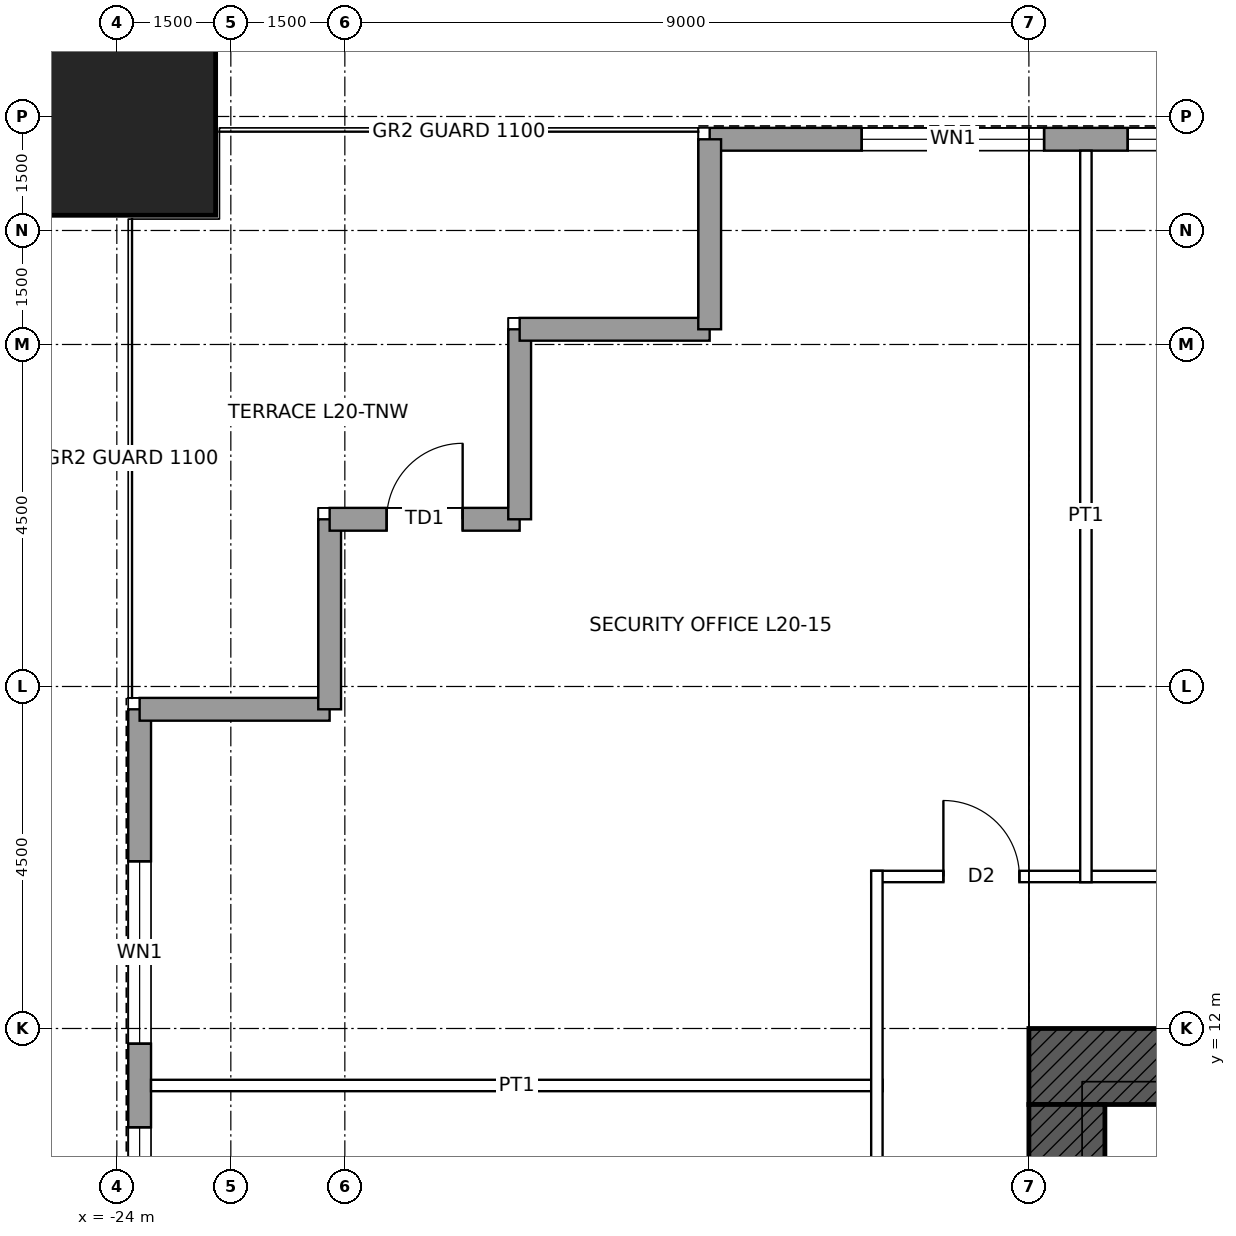
"""IFC4 building model, lengths in metres.
Left out: names, types, materials, properties, quantities, classifications, styles, units other than length and angle.
Written with IfcOpenShell. Run it as: python <this file> out.ifc"""

import sys

from ifc_helpers import new_model, si_unit, direction, frame, frame_2d, origin, origin_2d, place, context, subcontext, project, spatial, rectangle, hollow_rectangle, extrude, element, fill, save


model = new_model("IFC4")
c1 = context("Model", 3, precision=1e-05, world=origin(), true_north=direction((0.0, 1.0)))
c2 = subcontext(c1, "Body", "Model", "MODEL_VIEW")
j1 = project(units=[si_unit("LENGTHUNIT", "METRE"), si_unit("PLANEANGLEUNIT", "RADIAN")], contexts=[c1])
p1 = place(None, origin())
s1 = spatial("IfcSite", under=j1, at=p1, CompositionType="ELEMENT")
p2 = place(p1, origin())
s2 = spatial("IfcBuilding", under=s1, at=p2, CompositionType="ELEMENT")
p3 = place(p2, frame((0.0, 0.0, 104.4)))
s3 = spatial("IfcBuildingStorey", under=s2, at=p3, CompositionType="ELEMENT", Elevation=104.4)
p4 = place(p3, frame((-24.0, 24.0, 0.0), z_axis=(0.0, 0.0, 1.0), x_axis=(1.0, 0.0, 0.0)))
e1 = element("IfcColumn", 1, at=p4, inside=s3, PredefinedType="COLUMN", context=c2, shape_type="SweptSolid", body=[
    extrude(hollow_rectangle(XDim=2.6, YDim=2.6, WallThickness=0.13, at=origin_2d()), origin(), (0.0, 0.0, 1.0), 4.5),
])
p5 = place(p3, frame((-12.0, 11.5, 0.0), z_axis=(0.0, 0.0, 1.0), x_axis=(1.0, 0.0, 0.0)))
e2 = element("IfcWall", 2, at=p5, inside=s3, PredefinedType="SHEAR", context=c2, shape_type="SweptSolid", body=[
    extrude(rectangle(XDim=24.0, YDim=1.0, at=frame_2d((12.0, 0.0))), origin(), (0.0, 0.0, 1.0), 4.5),
])
p6 = place(p5, frame((6.25, 0.0, 0.0)))
e3 = element("IfcOpeningElement", 3, at=p6, cuts=e2, PredefinedType="OPENING", context=c2, shape_type="SweptSolid", body=[
    extrude(rectangle(XDim=1.0, YDim=2.4, at=frame_2d((0.5, 1.2))), frame((0.0, 0.51, 0.0), z_axis=(0.0, -1.0, 0.0), x_axis=(1.0, 0.0, 0.0)), (0.0, 0.0, 1.0), 1.02),
])
p7 = place(p5, frame((16.75, 0.0, 0.0)))
e4 = element("IfcOpeningElement", 4, at=p7, cuts=e2, PredefinedType="OPENING", context=c2, shape_type="SweptSolid", body=[
    extrude(rectangle(XDim=1.0, YDim=2.4, at=frame_2d((0.5, 1.2))), frame((0.0, 0.51, 0.0), z_axis=(0.0, -1.0, 0.0), x_axis=(1.0, 0.0, 0.0)), (0.0, 0.0, 1.0), 1.02),
])
p8 = place(p3, frame((-11.5, -11.0, 0.0), z_axis=(0.0, 0.0, 1.0), x_axis=(0.0, 1.0, 0.0)))
e5 = element("IfcWall", 5, at=p8, inside=s3, PredefinedType="SHEAR", context=c2, shape_type="SweptSolid", body=[
    extrude(rectangle(XDim=22.0, YDim=1.0, at=frame_2d((11.0, 0.0))), origin(), (0.0, 0.0, 1.0), 4.5),
])
p9 = place(p8, frame((10.5, 0.0, 0.0)))
e6 = element("IfcOpeningElement", 6, at=p9, cuts=e5, PredefinedType="OPENING", context=c2, shape_type="SweptSolid", body=[
    extrude(rectangle(XDim=1.0, YDim=2.4, at=frame_2d((0.5, 1.2))), frame((0.0, 0.51, 0.0), z_axis=(0.0, -1.0, 0.0), x_axis=(1.0, 0.0, 0.0)), (0.0, 0.0, 1.0), 1.02),
])
p10 = place(p3, frame((-16.2, 23.7, 0.0), z_axis=(0.0, 0.0, 1.0), x_axis=(1.0, 0.0, 0.0)))
e7 = element("IfcWall", 7, at=p10, inside=s3, PredefinedType="SOLIDWALL", context=c2, shape_type="SweptSolid", body=[
    extrude(rectangle(XDim=32.4, YDim=0.3, at=frame_2d((16.2, 0.0))), origin(), (0.0, 0.0, 1.0), 4.3),
])
p11 = place(p10, frame((2.0, 0.0, 1.0)))
e8 = element("IfcOpeningElement", 8, at=p11, cuts=e7, PredefinedType="OPENING", context=c2, shape_type="SweptSolid", body=[
    extrude(rectangle(XDim=2.4, YDim=1.2, at=frame_2d((1.2, 0.6))), frame((0.0, 0.16, 0.0), z_axis=(0.0, -1.0, 0.0), x_axis=(1.0, 0.0, 0.0)), (0.0, 0.0, 1.0), 0.32),
])
p12 = place(p10, frame((5.5, 0.0, 1.0)))
e9 = element("IfcOpeningElement", 9, at=p12, cuts=e7, PredefinedType="OPENING", context=c2, shape_type="SweptSolid", body=[
    extrude(rectangle(XDim=2.4, YDim=1.2, at=frame_2d((1.2, 0.6))), frame((0.0, 0.16, 0.0), z_axis=(0.0, -1.0, 0.0), x_axis=(1.0, 0.0, 0.0)), (0.0, 0.0, 1.0), 0.32),
])
p13 = place(p10, frame((9.5, 0.0, 1.0)))
e10 = element("IfcOpeningElement", 10, at=p13, cuts=e7, PredefinedType="OPENING", context=c2, shape_type="SweptSolid", body=[
    extrude(rectangle(XDim=2.4, YDim=1.2, at=frame_2d((1.2, 0.6))), frame((0.0, 0.16, 0.0), z_axis=(0.0, -1.0, 0.0), x_axis=(1.0, 0.0, 0.0)), (0.0, 0.0, 1.0), 0.32),
])
p14 = place(p10, frame((13.0, 0.0, 1.0)))
e11 = element("IfcOpeningElement", 11, at=p14, cuts=e7, PredefinedType="OPENING", context=c2, shape_type="SweptSolid", body=[
    extrude(rectangle(XDim=2.4, YDim=1.2, at=frame_2d((1.2, 0.6))), frame((0.0, 0.16, 0.0), z_axis=(0.0, -1.0, 0.0), x_axis=(1.0, 0.0, 0.0)), (0.0, 0.0, 1.0), 0.32),
])
p15 = place(p10, frame((17.0, 0.0, 1.0)))
e12 = element("IfcOpeningElement", 12, at=p15, cuts=e7, PredefinedType="OPENING", context=c2, shape_type="SweptSolid", body=[
    extrude(rectangle(XDim=2.4, YDim=1.2, at=frame_2d((1.2, 0.6))), frame((0.0, 0.16, 0.0), z_axis=(0.0, -1.0, 0.0), x_axis=(1.0, 0.0, 0.0)), (0.0, 0.0, 1.0), 0.32),
])
p16 = place(p10, frame((20.5, 0.0, 1.0)))
e13 = element("IfcOpeningElement", 13, at=p16, cuts=e7, PredefinedType="OPENING", context=c2, shape_type="SweptSolid", body=[
    extrude(rectangle(XDim=2.4, YDim=1.2, at=frame_2d((1.2, 0.6))), frame((0.0, 0.16, 0.0), z_axis=(0.0, -1.0, 0.0), x_axis=(1.0, 0.0, 0.0)), (0.0, 0.0, 1.0), 0.32),
])
p17 = place(p10, frame((24.5, 0.0, 1.0)))
e14 = element("IfcOpeningElement", 14, at=p17, cuts=e7, PredefinedType="OPENING", context=c2, shape_type="SweptSolid", body=[
    extrude(rectangle(XDim=2.4, YDim=1.2, at=frame_2d((1.2, 0.6))), frame((0.0, 0.16, 0.0), z_axis=(0.0, -1.0, 0.0), x_axis=(1.0, 0.0, 0.0)), (0.0, 0.0, 1.0), 0.32),
])
p18 = place(p10, frame((28.0, 0.0, 1.0)))
e15 = element("IfcOpeningElement", 15, at=p18, cuts=e7, PredefinedType="OPENING", context=c2, shape_type="SweptSolid", body=[
    extrude(rectangle(XDim=2.4, YDim=1.2, at=frame_2d((1.2, 0.6))), frame((0.0, 0.16, 0.0), z_axis=(0.0, -1.0, 0.0), x_axis=(1.0, 0.0, 0.0)), (0.0, 0.0, 1.0), 0.32),
])
p19 = place(p3, frame((-23.7, -16.2, 0.0), z_axis=(0.0, 0.0, 1.0), x_axis=(0.0, 1.0, 0.0)))
e16 = element("IfcWall", 16, at=p19, inside=s3, PredefinedType="SOLIDWALL", context=c2, shape_type="SweptSolid", body=[
    extrude(rectangle(XDim=32.4, YDim=0.3, at=frame_2d((16.2, 0.0))), origin(), (0.0, 0.0, 1.0), 4.3),
])
p20 = place(p19, frame((2.0, 0.0, 1.0)))
e17 = element("IfcOpeningElement", 17, at=p20, cuts=e16, PredefinedType="OPENING", context=c2, shape_type="SweptSolid", body=[
    extrude(rectangle(XDim=2.4, YDim=1.2, at=frame_2d((1.2, 0.6))), frame((0.0, 0.16, 0.0), z_axis=(0.0, -1.0, 0.0), x_axis=(1.0, 0.0, 0.0)), (0.0, 0.0, 1.0), 0.32),
])
p21 = place(p19, frame((5.5, 0.0, 1.0)))
e18 = element("IfcOpeningElement", 18, at=p21, cuts=e16, PredefinedType="OPENING", context=c2, shape_type="SweptSolid", body=[
    extrude(rectangle(XDim=2.4, YDim=1.2, at=frame_2d((1.2, 0.6))), frame((0.0, 0.16, 0.0), z_axis=(0.0, -1.0, 0.0), x_axis=(1.0, 0.0, 0.0)), (0.0, 0.0, 1.0), 0.32),
])
p22 = place(p19, frame((9.5, 0.0, 1.0)))
e19 = element("IfcOpeningElement", 19, at=p22, cuts=e16, PredefinedType="OPENING", context=c2, shape_type="SweptSolid", body=[
    extrude(rectangle(XDim=2.4, YDim=1.2, at=frame_2d((1.2, 0.6))), frame((0.0, 0.16, 0.0), z_axis=(0.0, -1.0, 0.0), x_axis=(1.0, 0.0, 0.0)), (0.0, 0.0, 1.0), 0.32),
])
p23 = place(p19, frame((13.0, 0.0, 1.0)))
e20 = element("IfcOpeningElement", 20, at=p23, cuts=e16, PredefinedType="OPENING", context=c2, shape_type="SweptSolid", body=[
    extrude(rectangle(XDim=2.4, YDim=1.2, at=frame_2d((1.2, 0.6))), frame((0.0, 0.16, 0.0), z_axis=(0.0, -1.0, 0.0), x_axis=(1.0, 0.0, 0.0)), (0.0, 0.0, 1.0), 0.32),
])
p24 = place(p19, frame((17.0, 0.0, 1.0)))
e21 = element("IfcOpeningElement", 21, at=p24, cuts=e16, PredefinedType="OPENING", context=c2, shape_type="SweptSolid", body=[
    extrude(rectangle(XDim=2.4, YDim=1.2, at=frame_2d((1.2, 0.6))), frame((0.0, 0.16, 0.0), z_axis=(0.0, -1.0, 0.0), x_axis=(1.0, 0.0, 0.0)), (0.0, 0.0, 1.0), 0.32),
])
p25 = place(p19, frame((20.5, 0.0, 1.0)))
e22 = element("IfcOpeningElement", 22, at=p25, cuts=e16, PredefinedType="OPENING", context=c2, shape_type="SweptSolid", body=[
    extrude(rectangle(XDim=2.4, YDim=1.2, at=frame_2d((1.2, 0.6))), frame((0.0, 0.16, 0.0), z_axis=(0.0, -1.0, 0.0), x_axis=(1.0, 0.0, 0.0)), (0.0, 0.0, 1.0), 0.32),
])
p26 = place(p19, frame((24.5, 0.0, 1.0)))
e23 = element("IfcOpeningElement", 23, at=p26, cuts=e16, PredefinedType="OPENING", context=c2, shape_type="SweptSolid", body=[
    extrude(rectangle(XDim=2.4, YDim=1.2, at=frame_2d((1.2, 0.6))), frame((0.0, 0.16, 0.0), z_axis=(0.0, -1.0, 0.0), x_axis=(1.0, 0.0, 0.0)), (0.0, 0.0, 1.0), 0.32),
])
p27 = place(p19, frame((28.0, 0.0, 1.0)))
e24 = element("IfcOpeningElement", 24, at=p27, cuts=e16, PredefinedType="OPENING", context=c2, shape_type="SweptSolid", body=[
    extrude(rectangle(XDim=2.4, YDim=1.2, at=frame_2d((1.2, 0.6))), frame((0.0, 0.16, 0.0), z_axis=(0.0, -1.0, 0.0), x_axis=(1.0, 0.0, 0.0)), (0.0, 0.0, 1.0), 0.32),
])
for number, where, z_axis, x_axis in (
    (25, (-23.7, 16.2, 0.0), (0.0, 0.0, 1.0), (1.0, 0.0, 0.0)),
    (26, (-21.2, 16.2, 0.0), (0.0, 0.0, 1.0), (0.0, 1.0, 0.0)),
):
    element("IfcWall", number, at=place(p3, frame(where, z_axis=z_axis, x_axis=x_axis)), inside=s3, PredefinedType="SOLIDWALL", context=c2, shape_type="SweptSolid", body=[
        extrude(rectangle(XDim=2.5, YDim=0.3, at=frame_2d((1.25, 0.0))), origin(), (0.0, 0.0, 1.0), 4.3),
    ])
p28 = place(p3, frame((-21.2, 18.7, 0.0), z_axis=(0.0, 0.0, 1.0), x_axis=(1.0, 0.0, 0.0)))
e27 = element("IfcWall", 27, at=p28, inside=s3, PredefinedType="SOLIDWALL", context=c2, shape_type="SweptSolid", body=[
    extrude(rectangle(XDim=2.5, YDim=0.3, at=frame_2d((1.25, 0.0))), origin(), (0.0, 0.0, 1.0), 4.3),
])
p29 = place(p28, frame((0.75, 0.0, 0.0)))
e28 = element("IfcOpeningElement", 28, at=p29, cuts=e27, PredefinedType="OPENING", context=c2, shape_type="SweptSolid", body=[
    extrude(rectangle(XDim=1.0, YDim=2.4, at=frame_2d((0.5, 1.2))), frame((0.0, 0.16, 0.0), z_axis=(0.0, -1.0, 0.0), x_axis=(1.0, 0.0, 0.0)), (0.0, 0.0, 1.0), 0.32),
])
for number, where, z_axis, x_axis in (
    (29, (-18.7, 18.7, 0.0), (0.0, 0.0, 1.0), (0.0, 1.0, 0.0)),
    (30, (-18.7, 21.2, 0.0), (0.0, 0.0, 1.0), (1.0, 0.0, 0.0)),
    (31, (-16.2, 21.2, 0.0), (0.0, 0.0, 1.0), (0.0, 1.0, 0.0)),
):
    element("IfcWall", number, at=place(p3, frame(where, z_axis=z_axis, x_axis=x_axis)), inside=s3, PredefinedType="SOLIDWALL", context=c2, shape_type="SweptSolid", body=[
        extrude(rectangle(XDim=2.5, YDim=0.3, at=frame_2d((1.25, 0.0))), origin(), (0.0, 0.0, 1.0), 4.3),
    ])
p30 = place(p3, frame((-23.55, 11.25, 0.0), z_axis=(0.0, 0.0, 1.0), x_axis=(1.0, 0.0, 0.0)))
e32 = element("IfcWall", 32, at=p30, inside=s3, PredefinedType="PARTITIONING", context=c2, shape_type="SweptSolid", body=[
    extrude(rectangle(XDim=9.625, YDim=0.15, at=frame_2d((4.812, 0.0))), origin(), (0.0, 0.0, 1.0), 3.431),
])
p31 = place(p3, frame((-14.075, 14.0, 0.0), z_axis=(0.0, 0.0, 1.0), x_axis=(1.0, 0.0, 0.0)))
e33 = element("IfcWall", 33, at=p31, inside=s3, PredefinedType="PARTITIONING", context=c2, shape_type="SweptSolid", body=[
    extrude(rectangle(XDim=28.15, YDim=0.15, at=frame_2d((14.075, 0.0))), origin(), (0.0, 0.0, 1.0), 4.3),
])
p32 = place(p31, frame((9.425, 0.0, 0.0)))
e34 = element("IfcOpeningElement", 34, at=p32, cuts=e33, PredefinedType="OPENING", context=c2, shape_type="SweptSolid", body=[
    extrude(rectangle(XDim=1.8, YDim=2.4, at=frame_2d((0.9, 1.2))), frame((0.0, 0.085, 0.0), z_axis=(0.0, -1.0, 0.0), x_axis=(1.0, 0.0, 0.0)), (0.0, 0.0, 1.0), 0.17),
])
p33 = place(p31, frame((20.675, 0.0, 0.0)))
e35 = element("IfcOpeningElement", 35, at=p33, cuts=e33, PredefinedType="OPENING", context=c2, shape_type="SweptSolid", body=[
    extrude(rectangle(XDim=1.8, YDim=2.4, at=frame_2d((0.9, 1.2))), frame((0.0, 0.085, 0.0), z_axis=(0.0, -1.0, 0.0), x_axis=(1.0, 0.0, 0.0)), (0.0, 0.0, 1.0), 0.17),
])
p34 = place(p31, frame((26.2, 0.0, 0.0)))
e36 = element("IfcOpeningElement", 36, at=p34, cuts=e33, PredefinedType="OPENING", context=c2, shape_type="SweptSolid", body=[
    extrude(rectangle(XDim=1.0, YDim=2.1, at=frame_2d((0.5, 1.05))), frame((0.0, 0.085, 0.0), z_axis=(0.0, -1.0, 0.0), x_axis=(1.0, 0.0, 0.0)), (0.0, 0.0, 1.0), 0.17),
])
p35 = place(p31, frame((0.95, 0.0, 0.0)))
e37 = element("IfcOpeningElement", 37, at=p35, cuts=e33, PredefinedType="OPENING", context=c2, shape_type="SweptSolid", body=[
    extrude(rectangle(XDim=1.0, YDim=2.1, at=frame_2d((0.5, 1.05))), frame((0.0, 0.085, 0.0), z_axis=(0.0, -1.0, 0.0), x_axis=(1.0, 0.0, 0.0)), (0.0, 0.0, 1.0), 0.17),
])
p36 = place(p3, frame((-14.0, -14.075, 0.0), z_axis=(0.0, 0.0, 1.0), x_axis=(0.0, 1.0, 0.0)))
e38 = element("IfcWall", 38, at=p36, inside=s3, PredefinedType="PARTITIONING", context=c2, shape_type="SweptSolid", body=[
    extrude(rectangle(XDim=28.15, YDim=0.15, at=frame_2d((14.075, 0.0))), origin(), (0.0, 0.0, 1.0), 4.3),
])
p37 = place(p36, frame((6.075, 0.0, 0.0)))
e39 = element("IfcOpeningElement", 39, at=p37, cuts=e38, PredefinedType="OPENING", context=c2, shape_type="SweptSolid", body=[
    extrude(rectangle(XDim=1.0, YDim=2.1, at=frame_2d((0.5, 1.05))), frame((0.0, 0.085, 0.0), z_axis=(0.0, -1.0, 0.0), x_axis=(1.0, 0.0, 0.0)), (0.0, 0.0, 1.0), 0.17),
])
p38 = place(p36, frame((16.925, 0.0, 0.0)))
e40 = element("IfcOpeningElement", 40, at=p38, cuts=e38, PredefinedType="OPENING", context=c2, shape_type="SweptSolid", body=[
    extrude(rectangle(XDim=1.8, YDim=2.4, at=frame_2d((0.9, 1.2))), frame((0.0, 0.085, 0.0), z_axis=(0.0, -1.0, 0.0), x_axis=(1.0, 0.0, 0.0)), (0.0, 0.0, 1.0), 0.17),
])
p39 = place(p3, frame((-11.25, 13.925, 0.0), z_axis=(0.0, 0.0, 1.0), x_axis=(0.0, 1.0, 0.0)))
e41 = element("IfcWall", 41, at=p39, inside=s3, PredefinedType="PARTITIONING", context=c2, shape_type="SweptSolid", body=[
    extrude(rectangle(XDim=9.625, YDim=0.15, at=frame_2d((4.812, 0.0))), origin(), (0.0, 0.0, 1.0), 3.431),
])
p40 = place(p11, origin())
e42 = element("IfcWindow", 42, at=p40, inside=s3, PartitioningType="SINGLE_PANEL", PredefinedType="WINDOW", context=c2, shape_type="SweptSolid", body=[
    extrude(rectangle(XDim=2.4, YDim=1.2, at=frame_2d((1.2, 0.6))), frame((0.0, 0.03, 0.0), z_axis=(0.0, -1.0, 0.0), x_axis=(1.0, 0.0, 0.0)), (0.0, 0.0, 1.0), 0.06),
])
fill(e8, e42)
p41 = place(p12, origin())
e43 = element("IfcWindow", 43, at=p41, inside=s3, PartitioningType="SINGLE_PANEL", PredefinedType="WINDOW", context=c2, shape_type="SweptSolid", body=[
    extrude(rectangle(XDim=2.4, YDim=1.2, at=frame_2d((1.2, 0.6))), frame((0.0, 0.03, 0.0), z_axis=(0.0, -1.0, 0.0), x_axis=(1.0, 0.0, 0.0)), (0.0, 0.0, 1.0), 0.06),
])
fill(e9, e43)
p42 = place(p26, origin())
e44 = element("IfcWindow", 44, at=p42, inside=s3, PartitioningType="SINGLE_PANEL", PredefinedType="WINDOW", context=c2, shape_type="SweptSolid", body=[
    extrude(rectangle(XDim=2.4, YDim=1.2, at=frame_2d((1.2, 0.6))), frame((0.0, 0.03, 0.0), z_axis=(0.0, -1.0, 0.0), x_axis=(1.0, 0.0, 0.0)), (0.0, 0.0, 1.0), 0.06),
])
fill(e23, e44)
p43 = place(p27, origin())
e45 = element("IfcWindow", 45, at=p43, inside=s3, PartitioningType="SINGLE_PANEL", PredefinedType="WINDOW", context=c2, shape_type="SweptSolid", body=[
    extrude(rectangle(XDim=2.4, YDim=1.2, at=frame_2d((1.2, 0.6))), frame((0.0, 0.03, 0.0), z_axis=(0.0, -1.0, 0.0), x_axis=(1.0, 0.0, 0.0)), (0.0, 0.0, 1.0), 0.06),
])
fill(e24, e45)
p44 = place(p29, origin())
e46 = element("IfcDoor", 46, at=p44, inside=s3, OperationType="SINGLE_SWING_RIGHT", PredefinedType="DOOR", context=c2, shape_type="SweptSolid", body=[
    extrude(rectangle(XDim=1.0, YDim=2.4, at=frame_2d((0.5, 1.2))), frame((0.0, 0.025, 0.0), z_axis=(0.0, -1.0, 0.0), x_axis=(1.0, 0.0, 0.0)), (0.0, 0.0, 1.0), 0.05),
])
fill(e28, e46)
p45 = place(p35, origin())
e47 = element("IfcDoor", 47, at=p45, inside=s3, OperationType="SINGLE_SWING_LEFT", PredefinedType="DOOR", context=c2, shape_type="SweptSolid", body=[
    extrude(rectangle(XDim=1.0, YDim=2.1, at=frame_2d((0.5, 1.05))), frame((0.0, 0.025, 0.0), z_axis=(0.0, -1.0, 0.0), x_axis=(1.0, 0.0, 0.0)), (0.0, 0.0, 1.0), 0.05),
])
fill(e37, e47)
save(model, sys.argv[1])
